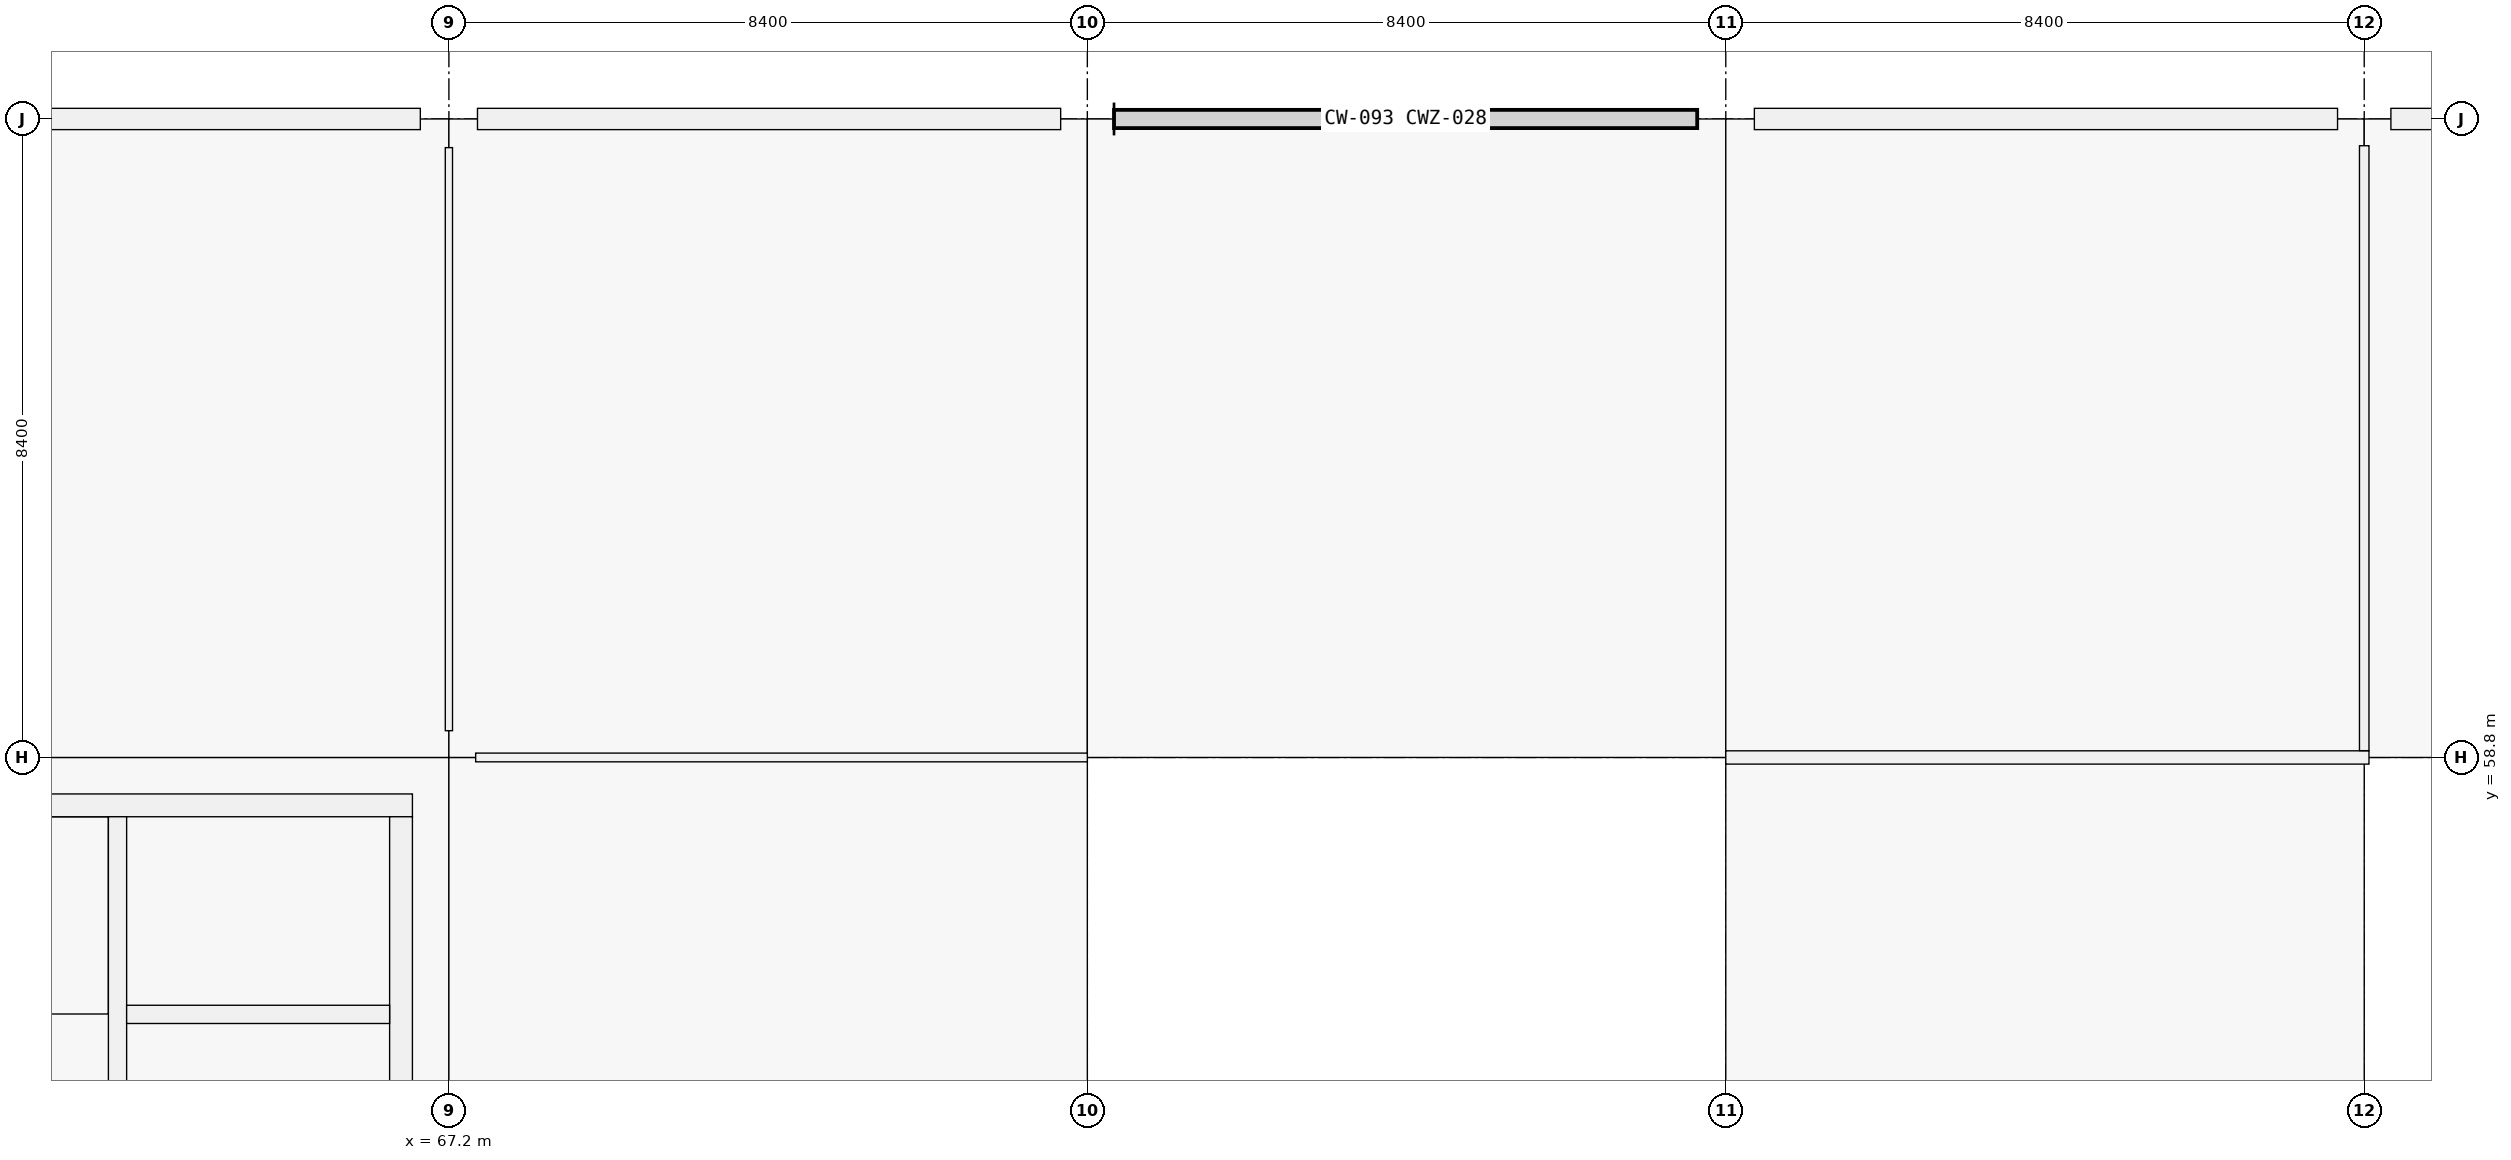
"""IFC4 building model, lengths in metres.
Left out: names, types, materials, properties, quantities, classifications, styles, units other than length and angle.
Written with IfcOpenShell. Run it as: python <this file> out.ifc"""

import sys

from ifc_helpers import new_model, si_unit, direction, frame, frame_2d, origin, origin_2d, place, context, subcontext, project, spatial, rectangle, extrude, element, fill, save


model = new_model("IFC4")
c1 = context("Model", 3, precision=1e-05, world=origin(), true_north=direction((0.0, 1.0)))
c2 = subcontext(c1, "Body", "Model", "MODEL_VIEW")
j1 = project(units=[si_unit("LENGTHUNIT", "METRE"), si_unit("PLANEANGLEUNIT", "RADIAN")], contexts=[c1])
p1 = place(None, origin())
s1 = spatial("IfcSite", under=j1, at=p1, CompositionType="ELEMENT")
p2 = place(p1, origin())
s2 = spatial("IfcBuilding", under=s1, at=p2, CompositionType="ELEMENT")
p3 = place(p2, frame((0.0, 0.0, 5.76)))
s3 = spatial("IfcBuildingStorey", under=s2, at=p3, CompositionType="ELEMENT", Elevation=5.76)
p4 = place(p3, frame((67.2, 58.8, 0.0), z_axis=(0.0, 0.0, 1.0), x_axis=(1.0, 0.0, 0.0)))
e1 = element("IfcColumn", 1, at=p4, inside=s3, PredefinedType="COLUMN", context=c2, shape_type="SweptSolid", body=[
    extrude(rectangle(XDim=0.7, YDim=0.7, at=origin_2d()), origin(), (0.0, 0.0, 1.0), 4.5),
])
p5 = place(p3, frame((67.2, 67.2, 0.0), z_axis=(0.0, 0.0, 1.0), x_axis=(1.0, 0.0, 0.0)))
e2 = element("IfcColumn", 2, at=p5, inside=s3, PredefinedType="COLUMN", context=c2, shape_type="SweptSolid", body=[
    extrude(rectangle(XDim=0.75, YDim=0.75, at=origin_2d()), origin(), (0.0, 0.0, 1.0), 4.5),
])
p6 = place(p3, frame((75.6, 67.2, 0.0), z_axis=(0.0, 0.0, 1.0), x_axis=(1.0, 0.0, 0.0)))
e3 = element("IfcColumn", 3, at=p6, inside=s3, PredefinedType="COLUMN", context=c2, shape_type="SweptSolid", body=[
    extrude(rectangle(XDim=0.7, YDim=0.7, at=origin_2d()), origin(), (0.0, 0.0, 1.0), 4.5),
])
p7 = place(p3, frame((84.0, 67.2, 0.0), z_axis=(0.0, 0.0, 1.0), x_axis=(1.0, 0.0, 0.0)))
e4 = element("IfcColumn", 4, at=p7, inside=s3, PredefinedType="COLUMN", context=c2, shape_type="SweptSolid", body=[
    extrude(rectangle(XDim=0.75, YDim=0.75, at=origin_2d()), origin(), (0.0, 0.0, 1.0), 4.5),
])
p8 = place(p3, frame((92.4, 67.2, 0.0), z_axis=(0.0, 0.0, 1.0), x_axis=(1.0, 0.0, 0.0)))
e5 = element("IfcColumn", 5, at=p8, inside=s3, PredefinedType="COLUMN", context=c2, shape_type="SweptSolid", body=[
    extrude(rectangle(XDim=0.7, YDim=0.7, at=origin_2d()), origin(), (0.0, 0.0, 1.0), 4.5),
])
p9 = place(p3, frame((59.201, 67.2, 0.0), z_axis=(0.0, 0.0, 1.0), x_axis=(1.0, 0.0, 0.0)))
e6 = element("IfcWall", 6, at=p9, inside=s3, PredefinedType="SOLIDWALL", context=c2, shape_type="SweptSolid", body=[
    extrude(rectangle(XDim=7.623, YDim=0.28, at=frame_2d((3.812, 0.0))), origin(), (0.0, 0.0, 1.0), 3.4),
])
p10 = place(p9, frame((2.787, 0.0, 0.9)))
e7 = element("IfcOpeningElement", 7, at=p10, cuts=e6, PredefinedType="OPENING", context=c2, shape_type="SweptSolid", body=[
    extrude(rectangle(XDim=2.05, YDim=1.45, at=frame_2d((1.025, 0.725))), frame((0.0, 0.14, 0.0), z_axis=(0.0, -1.0, 0.0), x_axis=(1.0, 0.0, 0.0)), (0.0, 0.0, 1.0), 0.28),
])
p11 = place(p3, frame((67.576, 67.2, 0.0), z_axis=(0.0, 0.0, 1.0), x_axis=(1.0, 0.0, 0.0)))
e8 = element("IfcWall", 8, at=p11, inside=s3, PredefinedType="SOLIDWALL", context=c2, shape_type="SweptSolid", body=[
    extrude(rectangle(XDim=7.673, YDim=0.28, at=frame_2d((3.836, 0.0))), origin(), (0.0, 0.0, 1.0), 3.4),
])
p12 = place(p11, frame((2.787, 0.0, 0.9)))
e9 = element("IfcOpeningElement", 9, at=p12, cuts=e8, PredefinedType="OPENING", context=c2, shape_type="SweptSolid", body=[
    extrude(rectangle(XDim=2.1, YDim=1.8, at=frame_2d((1.05, 0.9))), frame((0.0, 0.14, 0.0), z_axis=(0.0, -1.0, 0.0), x_axis=(1.0, 0.0, 0.0)), (0.0, 0.0, 1.0), 0.28),
])
p13 = place(p3, frame((84.376, 67.2, 0.0), z_axis=(0.0, 0.0, 1.0), x_axis=(1.0, 0.0, 0.0)))
e10 = element("IfcWall", 10, at=p13, inside=s3, PredefinedType="SOLIDWALL", context=c2, shape_type="SweptSolid", body=[
    extrude(rectangle(XDim=7.673, YDim=0.28, at=frame_2d((3.836, 0.0))), origin(), (0.0, 0.0, 1.0), 3.4),
])
p14 = place(p13, frame((3.236, 0.0, 0.9)))
e11 = element("IfcOpeningElement", 11, at=p14, cuts=e10, PredefinedType="OPENING", context=c2, shape_type="SweptSolid", body=[
    extrude(rectangle(XDim=1.2, YDim=2.1, at=frame_2d((0.6, 1.05))), frame((0.0, 0.14, 0.0), z_axis=(0.0, -1.0, 0.0), x_axis=(1.0, 0.0, 0.0)), (0.0, 0.0, 1.0), 0.28),
])
p15 = place(p3, frame((92.751, 67.2, 0.0), z_axis=(0.0, 0.0, 1.0), x_axis=(1.0, 0.0, 0.0)))
e12 = element("IfcWall", 12, at=p15, inside=s3, PredefinedType="SOLIDWALL", context=c2, shape_type="SweptSolid", body=[
    extrude(rectangle(XDim=7.673, YDim=0.28, at=frame_2d((3.836, 0.0))), origin(), (0.0, 0.0, 1.0), 3.4),
])
p16 = place(p15, frame((2.437, 0.0, 0.9)))
e13 = element("IfcOpeningElement", 13, at=p16, cuts=e12, PredefinedType="OPENING", context=c2, shape_type="SweptSolid", body=[
    extrude(rectangle(XDim=2.8, YDim=1.75, at=frame_2d((1.4, 0.875))), frame((0.0, 0.14, 0.0), z_axis=(0.0, -1.0, 0.0), x_axis=(1.0, 0.0, 0.0)), (0.0, 0.0, 1.0), 0.28),
])
p17 = place(p3, frame((59.28, 58.17, 0.0), z_axis=(0.0, 0.0, 1.0), x_axis=(1.0, 0.0, 0.0)))
e14 = element("IfcWall", 14, at=p17, inside=s3, PredefinedType="SHEAR", context=c2, shape_type="SweptSolid", body=[
    extrude(rectangle(XDim=7.44, YDim=0.3, at=frame_2d((3.72, 0.0))), origin(), (0.0, 0.0, 1.0), 4.5),
])
p18 = place(p3, frame((66.57, 58.02, 0.0), z_axis=(0.0, 0.0, 1.0), x_axis=(0.0, -1.0, 0.0)))
e15 = element("IfcWall", 15, at=p18, inside=s3, PredefinedType="SHEAR", context=c2, shape_type="SweptSolid", body=[
    extrude(rectangle(XDim=6.84, YDim=0.3, at=frame_2d((3.42, 0.0))), origin(), (0.0, 0.0, 1.0), 4.5),
])
p19 = place(p18, frame((3.97, 0.0, 0.0)))
e16 = element("IfcOpeningElement", 16, at=p19, cuts=e15, PredefinedType="OPENING", context=c2, shape_type="SweptSolid", body=[
    extrude(rectangle(XDim=1.5, YDim=2.15, at=frame_2d((0.75, 1.075))), frame((0.0, 0.15, 0.0), z_axis=(0.0, -1.0, 0.0), x_axis=(1.0, 0.0, 0.0)), (0.0, 0.0, 1.0), 0.3),
])
p20 = place(p3, frame((62.84, 51.18, 0.0), z_axis=(0.0, 0.0, 1.0), x_axis=(0.0, 1.0, 0.0)))
e17 = element("IfcWall", 17, at=p20, inside=s3, PredefinedType="SHEAR", context=c2, shape_type="SweptSolid", body=[
    extrude(rectangle(XDim=6.84, YDim=0.24, at=frame_2d((3.42, 0.0))), origin(), (0.0, 0.0, 1.0), 4.5),
])
p21 = place(p20, frame((0.12, 0.0, 0.0)))
e18 = element("IfcOpeningElement", 18, at=p21, cuts=e17, PredefinedType="OPENING", context=c2, shape_type="SweptSolid", body=[
    extrude(rectangle(XDim=1.0, YDim=2.15, at=frame_2d((0.5, 1.075))), frame((0.0, 0.12, 0.0), z_axis=(0.0, -1.0, 0.0), x_axis=(1.0, 0.0, 0.0)), (0.0, 0.0, 1.0), 0.24),
])
p22 = place(p3, frame((62.96, 55.42, 0.0), z_axis=(0.0, 0.0, 1.0), x_axis=(1.0, 0.0, 0.0)))
e19 = element("IfcWall", 19, at=p22, inside=s3, PredefinedType="SHEAR", context=c2, shape_type="SweptSolid", body=[
    extrude(rectangle(XDim=3.46, YDim=0.24, at=frame_2d((1.73, 0.0))), origin(), (0.0, 0.0, 1.0), 4.5),
])
p23 = place(p22, frame((1.18, 0.0, 0.0)))
e20 = element("IfcOpeningElement", 20, at=p23, cuts=e19, PredefinedType="OPENING", context=c2, shape_type="SweptSolid", body=[
    extrude(rectangle(XDim=1.1, YDim=2.15, at=frame_2d((0.55, 1.075))), frame((0.0, 0.12, 0.0), z_axis=(0.0, -1.0, 0.0), x_axis=(1.0, 0.0, 0.0)), (0.0, 0.0, 1.0), 0.24),
])
p24 = place(p3, frame((67.552, 58.8, 0.0), z_axis=(0.0, 0.0, 1.0), x_axis=(1.0, 0.0, 0.0)))
e21 = element("IfcWall", 21, at=p24, inside=s3, PredefinedType="PARTITIONING", context=c2, shape_type="SweptSolid", body=[
    extrude(rectangle(XDim=8.048, YDim=0.115, at=frame_2d((4.024, 0.0))), origin(), (0.0, 0.0, 1.0), 2.4),
])
p25 = place(p24, frame((3.324, 0.0, 0.0)))
e22 = element("IfcOpeningElement", 22, at=p25, cuts=e21, PredefinedType="OPENING", context=c2, shape_type="SweptSolid", body=[
    extrude(rectangle(XDim=1.4, YDim=2.22, at=frame_2d((0.7, 1.11))), frame((0.0, 0.058, 0.0), z_axis=(0.0, -1.0, 0.0), x_axis=(1.0, 0.0, 0.0)), (0.0, 0.0, 1.0), 0.115),
])
p26 = place(p3, frame((84.0, 58.8, 0.0), z_axis=(0.0, 0.0, 1.0), x_axis=(1.0, 0.0, 0.0)))
e23 = element("IfcWall", 23, at=p26, inside=s3, PredefinedType="PARTITIONING", context=c2, shape_type="SweptSolid", body=[
    extrude(rectangle(XDim=8.462, YDim=0.175, at=frame_2d((4.231, 0.0))), origin(), (0.0, 0.0, 1.0), 2.4),
])
p27 = place(p26, frame((3.556, 0.0, 0.0)))
e24 = element("IfcOpeningElement", 24, at=p27, cuts=e23, PredefinedType="OPENING", context=c2, shape_type="SweptSolid", body=[
    extrude(rectangle(XDim=1.35, YDim=2.2, at=frame_2d((0.675, 1.1))), frame((0.0, 0.087, 0.0), z_axis=(0.0, -1.0, 0.0), x_axis=(1.0, 0.0, 0.0)), (0.0, 0.0, 1.0), 0.175),
])
p28 = place(p3, frame((67.2, 59.152, 0.0), z_axis=(0.0, 0.0, 1.0), x_axis=(0.0, 1.0, 0.0)))
e25 = element("IfcWall", 25, at=p28, inside=s3, PredefinedType="PARTITIONING", context=c2, shape_type="SweptSolid", body=[
    extrude(rectangle(XDim=7.671, YDim=0.095, at=frame_2d((3.835, 0.0))), origin(), (0.0, 0.0, 1.0), 2.4),
])
p29 = place(p28, frame((3.086, 0.0, 0.0)))
e26 = element("IfcOpeningElement", 26, at=p29, cuts=e25, PredefinedType="OPENING", context=c2, shape_type="SweptSolid", body=[
    extrude(rectangle(XDim=1.5, YDim=2.22, at=frame_2d((0.75, 1.11))), frame((0.0, 0.047, 0.0), z_axis=(0.0, -1.0, 0.0), x_axis=(1.0, 0.0, 0.0)), (0.0, 0.0, 1.0), 0.095),
])
p30 = place(p3, frame((92.4, 58.889, 0.0), z_axis=(0.0, 0.0, 1.0), x_axis=(0.0, 1.0, 0.0)))
e27 = element("IfcWall", 27, at=p30, inside=s3, PredefinedType="PARTITIONING", context=c2, shape_type="SweptSolid", body=[
    extrude(rectangle(XDim=7.958, YDim=0.125, at=frame_2d((3.979, 0.0))), origin(), (0.0, 0.0, 1.0), 2.4),
])
p31 = place(p30, frame((3.279, 0.0, 0.0)))
e28 = element("IfcOpeningElement", 28, at=p31, cuts=e27, PredefinedType="OPENING", context=c2, shape_type="SweptSolid", body=[
    extrude(rectangle(XDim=1.4, YDim=2.22, at=frame_2d((0.7, 1.11))), frame((0.0, 0.062, 0.0), z_axis=(0.0, -1.0, 0.0), x_axis=(1.0, 0.0, 0.0)), (0.0, 0.0, 1.0), 0.125),
])
p32 = place(p10, origin())
e29 = element("IfcWindow", 29, at=p32, inside=s3, PartitioningType="SINGLE_PANEL", PredefinedType="WINDOW", context=c2, shape_type="SweptSolid", body=[
    extrude(rectangle(XDim=2.05, YDim=1.45, at=frame_2d((1.025, 0.725))), frame((0.0, 0.03, 0.0), z_axis=(0.0, -1.0, 0.0), x_axis=(1.0, 0.0, 0.0)), (0.0, 0.0, 1.0), 0.06),
])
fill(e7, e29)
p33 = place(p12, origin())
e30 = element("IfcWindow", 30, at=p33, inside=s3, PartitioningType="SINGLE_PANEL", PredefinedType="WINDOW", context=c2, shape_type="SweptSolid", body=[
    extrude(rectangle(XDim=2.1, YDim=1.8, at=frame_2d((1.05, 0.9))), frame((0.0, 0.03, 0.0), z_axis=(0.0, -1.0, 0.0), x_axis=(1.0, 0.0, 0.0)), (0.0, 0.0, 1.0), 0.06),
])
fill(e9, e30)
p34 = place(p14, origin())
e31 = element("IfcWindow", 31, at=p34, inside=s3, PartitioningType="SINGLE_PANEL", PredefinedType="WINDOW", context=c2, shape_type="SweptSolid", body=[
    extrude(rectangle(XDim=1.2, YDim=2.1, at=frame_2d((0.6, 1.05))), frame((0.0, 0.03, 0.0), z_axis=(0.0, -1.0, 0.0), x_axis=(1.0, 0.0, 0.0)), (0.0, 0.0, 1.0), 0.06),
])
fill(e11, e31)
p35 = place(p23, origin())
e32 = element("IfcDoor", 32, at=p35, inside=s3, OperationType="DOUBLE_DOOR_SLIDING", PredefinedType="DOOR", context=c2, shape_type="SweptSolid", body=[
    extrude(rectangle(XDim=1.1, YDim=2.15, at=frame_2d((0.55, 1.075))), frame((0.0, 0.025, 0.0), z_axis=(0.0, -1.0, 0.0), x_axis=(1.0, 0.0, 0.0)), (0.0, 0.0, 1.0), 0.05),
])
fill(e20, e32)
p36 = place(p25, origin())
e33 = element("IfcDoor", 33, at=p36, inside=s3, OperationType="DOUBLE_DOOR_SINGLE_SWING", PredefinedType="DOOR", context=c2, shape_type="SweptSolid", body=[
    extrude(rectangle(XDim=1.4, YDim=2.22, at=frame_2d((0.7, 1.11))), frame((0.0, 0.025, 0.0), z_axis=(0.0, -1.0, 0.0), x_axis=(1.0, 0.0, 0.0)), (0.0, 0.0, 1.0), 0.05),
])
fill(e22, e33)
p37 = place(p27, origin())
e34 = element("IfcDoor", 34, at=p37, inside=s3, OperationType="DOUBLE_DOOR_SINGLE_SWING", PredefinedType="DOOR", context=c2, shape_type="SweptSolid", body=[
    extrude(rectangle(XDim=1.35, YDim=2.2, at=frame_2d((0.675, 1.1))), frame((0.0, 0.025, 0.0), z_axis=(0.0, -1.0, 0.0), x_axis=(1.0, 0.0, 0.0)), (0.0, 0.0, 1.0), 0.05),
])
fill(e24, e34)
p38 = place(p29, origin())
e35 = element("IfcDoor", 35, at=p38, inside=s3, OperationType="DOUBLE_DOOR_SINGLE_SWING", PredefinedType="DOOR", context=c2, shape_type="SweptSolid", body=[
    extrude(rectangle(XDim=1.5, YDim=2.22, at=frame_2d((0.75, 1.11))), frame((0.0, 0.025, 0.0), z_axis=(0.0, -1.0, 0.0), x_axis=(1.0, 0.0, 0.0)), (0.0, 0.0, 1.0), 0.05),
])
fill(e26, e35)
p39 = place(p31, origin())
e36 = element("IfcDoor", 36, at=p39, inside=s3, OperationType="DOUBLE_DOOR_SINGLE_SWING", PredefinedType="DOOR", context=c2, shape_type="SweptSolid", body=[
    extrude(rectangle(XDim=1.4, YDim=2.22, at=frame_2d((0.7, 1.11))), frame((0.0, 0.025, 0.0), z_axis=(0.0, -1.0, 0.0), x_axis=(1.0, 0.0, 0.0)), (0.0, 0.0, 1.0), 0.05),
])
fill(e28, e36)
save(model, sys.argv[1])
